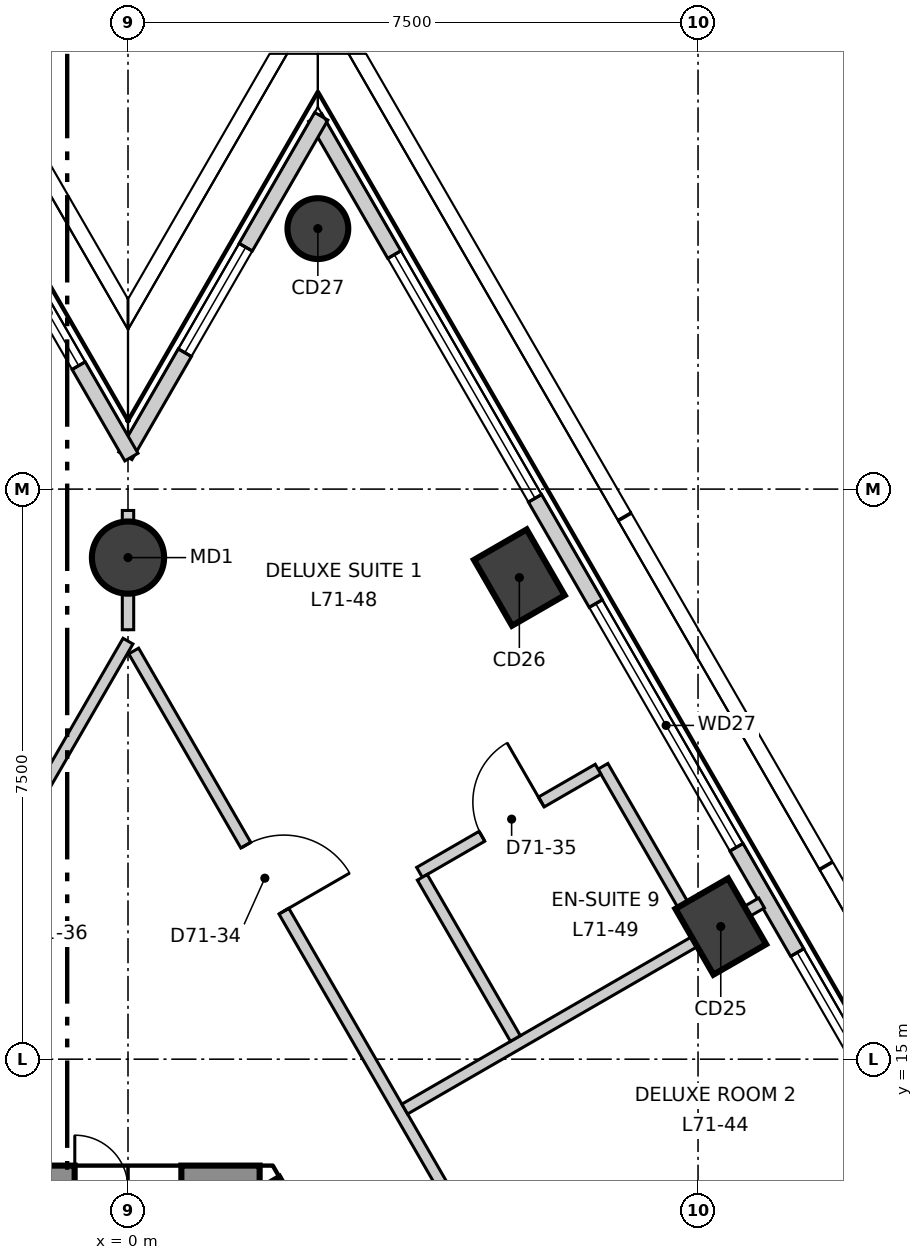
"""IFC4 building model, lengths in metres.
Left out: names, types, materials, properties, quantities, classifications, styles, units other than length and angle.
Written with IfcOpenShell. Run it as: python <this file> out.ifc"""

import sys

from ifc_helpers import new_model, si_unit, direction, frame, frame_2d, origin, origin_2d, place, context, subcontext, project, spatial, polyline, rectangle, circle, outline, extrude, element, fill, save


model = new_model("IFC4")
c1 = context("Model", 3, precision=1e-05, world=origin(), true_north=direction((0.0, 1.0)))
c2 = subcontext(c1, "Body", "Model", "MODEL_VIEW")
j1 = project(units=[si_unit("LENGTHUNIT", "METRE"), si_unit("PLANEANGLEUNIT", "RADIAN")], contexts=[c1])
p1 = place(None, origin())
s1 = spatial("IfcSite", under=j1, at=p1, CompositionType="ELEMENT")
p2 = place(p1, origin())
s2 = spatial("IfcBuilding", under=s1, at=p2, CompositionType="ELEMENT")
p3 = place(p2, frame((0.0, 0.0, 300.7)))
s3 = spatial("IfcBuildingStorey", under=s2, at=p3, CompositionType="ELEMENT", Elevation=300.7)
p4 = place(p3, frame((1.732, 13.3, -0.3), z_axis=(0.0, 0.0, 1.0), x_axis=(-1.0, 0.0, 0.0)))
e1 = element("IfcWall", 1, at=p4, inside=s3, PredefinedType="SHEAR", context=c2, shape_type="SweptSolid", body=[
    extrude(outline(polyline([(-0.173, -0.3), (1.732, -0.3), (3.637, -0.3), (3.291, 0.3), (1.732, 0.3), (0.173, 0.3), (-0.173, -0.3)])), origin(), (0.0, 0.0, 1.0), 3.6),
])
p5 = place(p4, frame((1.032, 0.0, 0.3)))
e2 = element("IfcOpeningElement", 2, at=p5, cuts=e1, PredefinedType="OPENING", context=c2, shape_type="SweptSolid", body=[
    extrude(rectangle(XDim=1.4, YDim=2.1, at=frame_2d((0.7, 1.05))), frame((0.0, 0.31, 0.0), z_axis=(0.0, -1.0, 0.0), x_axis=(1.0, 0.0, 0.0)), (0.0, 0.0, 1.0), 0.62),
])
p6 = place(p3, frame((12.384, -5.15, -0.3), z_axis=(0.0, 0.0, 1.0), x_axis=(-0.500000539815, 0.866025092122, 0.0)))
e3 = element("IfcWall", 3, at=p6, inside=s3, PredefinedType="SHEAR", context=c2, shape_type="SweptSolid", body=[
    extrude(outline(polyline([(-0.173, -0.301), (1.795, -0.301), (3.763, -0.301), (5.731, -0.301), (7.7, -0.301), (9.668, -0.301), (11.636, -0.301), (13.604, -0.3), (15.573, -0.3), (17.541, -0.3), (19.509, -0.3), (21.477, -0.3), (21.131, 0.3), (19.226, 0.3), (17.321, 0.3), (15.415, 0.3), (13.51, 0.3), (11.605, 0.3), (9.699, 0.3), (7.794, 0.3), (5.889, 0.3), (3.984, 0.3), (2.078, 0.3), (0.173, 0.3), (-0.173, -0.301)])), origin(), (0.0, 0.0, 1.0), 3.6),
])
p7 = place(p6, frame((16.328, 0.0, 0.3)))
e4 = element("IfcOpeningElement", 4, at=p7, cuts=e3, PredefinedType="OPENING", context=c2, shape_type="SweptSolid", body=[
    extrude(rectangle(XDim=1.0, YDim=2.1, at=frame_2d((0.5, 1.05))), frame((0.0, 0.31, 0.0), z_axis=(0.0, -1.0, 0.0), x_axis=(1.0, 0.0, 0.0)), (0.0, 0.0, 1.0), 0.621),
])
p8 = place(p6, frame((4.777, 0.0, 0.3)))
e5 = element("IfcOpeningElement", 5, at=p8, cuts=e3, PredefinedType="OPENING", context=c2, shape_type="SweptSolid", body=[
    extrude(rectangle(XDim=0.9, YDim=2.1, at=frame_2d((0.45, 1.05))), frame((0.0, 0.31, 0.0), z_axis=(0.0, -1.0, 0.0), x_axis=(1.0, 0.0, 0.0)), (0.0, 0.0, 1.0), 0.621),
])
for number, where, z_axis, x_axis in (
    (6, (7.799, 16.745, -0.3), (0.0, 0.0, 1.0), (-0.5, 0.866, 0.0)),
    (7, (5.149, 21.336, -0.3), (0.0, 0.0, 1.0), (-0.5, 0.866, 0.0)),
):
    element("IfcColumn", number, at=place(p3, frame(where, z_axis=z_axis, x_axis=x_axis)), inside=s3, PredefinedType="COLUMN", context=c2, shape_type="SweptSolid", body=[
        extrude(rectangle(XDim=1.0, YDim=0.8, at=origin_2d()), origin(), (0.0, 0.0, 1.0), 3.6),
    ])
p9 = place(p3, frame((2.498, 25.927, -0.3), z_axis=(0.0, 0.0, 1.0), x_axis=(-0.5, 0.866025403784, 0.0)))
e8 = element("IfcColumn", 8, at=p9, inside=s3, PredefinedType="COLUMN", context=c2, shape_type="SweptSolid", body=[
    extrude(circle(Radius=0.4, at=origin_2d()), origin(), (0.0, 0.0, 1.0), 3.6),
])
p10 = place(p3, frame((0.0, 21.599, -0.3), z_axis=(0.0, 0.0, 1.0), x_axis=(1.0, 0.0, 0.0)))
e9 = element("IfcColumn", 9, at=p10, inside=s3, PredefinedType="COLUMN", context=c2, shape_type="SweptSolid", body=[
    extrude(circle(Radius=0.475, at=origin_2d()), origin(), (0.0, 0.0, 1.0), 3.6),
])
p11 = place(p3, frame((24.96, -11.578, 0.0), z_axis=(0.0, 0.0, 1.0), x_axis=(-0.500002391419, 0.866024023094, 0.0)))
e10 = element("IfcWall", 10, at=p11, inside=s3, PredefinedType="ELEMENTEDWALL", context=c2, shape_type="SweptSolid", body=[
    extrude(rectangle(XDim=44.994, YDim=0.2, at=frame_2d((22.497, 0.0))), origin(), (0.0, 0.0, 1.0), 3.3),
])
p12 = place(p11, frame((2.103, 0.0, 0.9)))
e11 = element("IfcOpeningElement", 11, at=p12, cuts=e10, PredefinedType="OPENING", context=c2, shape_type="SweptSolid", body=[
    extrude(rectangle(XDim=3.7, YDim=2.2, at=frame_2d((1.85, 1.1))), frame((0.0, 0.11, 0.0), z_axis=(0.0, -1.0, 0.0), x_axis=(1.0, 0.0, 0.0)), (0.0, 0.0, 1.0), 0.22),
])
p13 = place(p11, frame((7.404, 0.0, 0.9)))
e12 = element("IfcOpeningElement", 12, at=p13, cuts=e10, PredefinedType="OPENING", context=c2, shape_type="SweptSolid", body=[
    extrude(rectangle(XDim=3.7, YDim=2.2, at=frame_2d((1.85, 1.1))), frame((0.0, 0.11, 0.0), z_axis=(0.0, -1.0, 0.0), x_axis=(1.0, 0.0, 0.0)), (0.0, 0.0, 1.0), 0.22),
])
p14 = place(p11, frame((12.705, 0.0, 0.9)))
e13 = element("IfcOpeningElement", 13, at=p14, cuts=e10, PredefinedType="OPENING", context=c2, shape_type="SweptSolid", body=[
    extrude(rectangle(XDim=3.7, YDim=2.2, at=frame_2d((1.85, 1.1))), frame((0.0, 0.11, 0.0), z_axis=(0.0, -1.0, 0.0), x_axis=(1.0, 0.0, 0.0)), (0.0, 0.0, 1.0), 0.22),
])
p15 = place(p11, frame((18.006, 0.0, 0.9)))
e14 = element("IfcOpeningElement", 14, at=p15, cuts=e10, PredefinedType="OPENING", context=c2, shape_type="SweptSolid", body=[
    extrude(rectangle(XDim=3.7, YDim=2.2, at=frame_2d((1.85, 1.1))), frame((0.0, 0.11, 0.0), z_axis=(0.0, -1.0, 0.0), x_axis=(1.0, 0.0, 0.0)), (0.0, 0.0, 1.0), 0.22),
])
p16 = place(p11, frame((23.308, 0.0, 0.9)))
e15 = element("IfcOpeningElement", 15, at=p16, cuts=e10, PredefinedType="OPENING", context=c2, shape_type="SweptSolid", body=[
    extrude(rectangle(XDim=3.7, YDim=2.2, at=frame_2d((1.85, 1.1))), frame((0.0, 0.11, 0.0), z_axis=(0.0, -1.0, 0.0), x_axis=(1.0, 0.0, 0.0)), (0.0, 0.0, 1.0), 0.22),
])
p17 = place(p11, frame((28.609, 0.0, 0.9)))
e16 = element("IfcOpeningElement", 16, at=p17, cuts=e10, PredefinedType="OPENING", context=c2, shape_type="SweptSolid", body=[
    extrude(rectangle(XDim=3.7, YDim=2.2, at=frame_2d((1.85, 1.1))), frame((0.0, 0.11, 0.0), z_axis=(0.0, -1.0, 0.0), x_axis=(1.0, 0.0, 0.0)), (0.0, 0.0, 1.0), 0.22),
])
p18 = place(p11, frame((33.91, 0.0, 0.9)))
e17 = element("IfcOpeningElement", 17, at=p18, cuts=e10, PredefinedType="OPENING", context=c2, shape_type="SweptSolid", body=[
    extrude(rectangle(XDim=3.7, YDim=2.2, at=frame_2d((1.85, 1.1))), frame((0.0, 0.11, 0.0), z_axis=(0.0, -1.0, 0.0), x_axis=(1.0, 0.0, 0.0)), (0.0, 0.0, 1.0), 0.22),
])
p19 = place(p11, frame((39.211, 0.0, 0.9)))
e18 = element("IfcOpeningElement", 18, at=p19, cuts=e10, PredefinedType="OPENING", context=c2, shape_type="SweptSolid", body=[
    extrude(rectangle(XDim=3.7, YDim=2.2, at=frame_2d((1.85, 1.1))), frame((0.0, 0.11, 0.0), z_axis=(0.0, -1.0, 0.0), x_axis=(1.0, 0.0, 0.0)), (0.0, 0.0, 1.0), 0.22),
])
p20 = place(p3, frame((2.543, 27.405, 0.0), z_axis=(0.0, 0.0, 1.0), x_axis=(-0.49983036304, -0.866123321579, 0.0)))
e19 = element("IfcWall", 19, at=p20, inside=s3, PredefinedType="ELEMENTEDWALL", context=c2, shape_type="SweptSolid", body=[
    extrude(rectangle(XDim=5.157, YDim=0.2, at=frame_2d((2.579, 0.0))), origin(), (0.0, 0.0, 1.0), 3.3),
])
p21 = place(p20, frame((1.99, 0.0, 0.9)))
e20 = element("IfcOpeningElement", 20, at=p21, cuts=e19, PredefinedType="OPENING", context=c2, shape_type="SweptSolid", body=[
    extrude(rectangle(XDim=1.6, YDim=2.2, at=frame_2d((0.8, 1.1))), frame((0.0, 0.11, 0.0), z_axis=(0.0, -1.0, 0.0), x_axis=(1.0, 0.0, 0.0)), (0.0, 0.0, 1.0), 0.22),
])
p22 = place(p3, frame((0.045, 22.921, 0.0), z_axis=(0.0, 0.0, 1.0), x_axis=(-0.49983036304, 0.866123321579, 0.0)))
e21 = element("IfcWall", 21, at=p22, inside=s3, PredefinedType="ELEMENTEDWALL", context=c2, shape_type="SweptSolid", body=[
    extrude(rectangle(XDim=5.157, YDim=0.2, at=frame_2d((2.579, 0.0))), origin(), (0.0, 0.0, 1.0), 3.3),
])
p23 = place(p22, frame((1.39, 0.0, 0.9)))
e22 = element("IfcOpeningElement", 22, at=p23, cuts=e21, PredefinedType="OPENING", context=c2, shape_type="SweptSolid", body=[
    extrude(rectangle(XDim=1.6, YDim=2.2, at=frame_2d((0.8, 1.1))), frame((0.0, 0.11, 0.0), z_axis=(0.0, -1.0, 0.0), x_axis=(1.0, 0.0, 0.0)), (0.0, 0.0, 1.0), 0.22),
])
p24 = place(p3, frame((-17.679, -10.12, 0.0), z_axis=(0.0, 0.0, 1.0), x_axis=(0.500008955215, 0.866020233427, 0.0)))
e23 = element("IfcWall", 23, at=p24, inside=s3, PredefinedType="PARTITIONING", context=c2, shape_type="SweptSolid", body=[
    extrude(rectangle(XDim=35.357, YDim=0.15, at=frame_2d((17.679, 0.0))), origin(), (0.0, 0.0, 1.0), 3.3),
])
p25 = place(p24, frame((31.307, 0.0, 0.0)))
e24 = element("IfcOpeningElement", 24, at=p25, cuts=e23, PredefinedType="OPENING", context=c2, shape_type="SweptSolid", body=[
    extrude(rectangle(XDim=1.0, YDim=2.1, at=frame_2d((0.5, 1.05))), frame((0.0, 0.085, 0.0), z_axis=(0.0, -1.0, 0.0), x_axis=(1.0, 0.0, 0.0)), (0.0, 0.0, 1.0), 0.17),
])
p26 = place(p24, frame((20.056, 0.0, 0.0)))
e25 = element("IfcOpeningElement", 25, at=p26, cuts=e23, PredefinedType="OPENING", context=c2, shape_type="SweptSolid", body=[
    extrude(rectangle(XDim=1.0, YDim=2.1, at=frame_2d((0.5, 1.05))), frame((0.0, 0.085, 0.0), z_axis=(0.0, -1.0, 0.0), x_axis=(1.0, 0.0, 0.0)), (0.0, 0.0, 1.0), 0.17),
])
p27 = place(p24, frame((13.253, 0.0, 0.0)))
e26 = element("IfcOpeningElement", 26, at=p27, cuts=e23, PredefinedType="OPENING", context=c2, shape_type="SweptSolid", body=[
    extrude(rectangle(XDim=1.0, YDim=2.1, at=frame_2d((0.5, 1.05))), frame((0.0, 0.085, 0.0), z_axis=(0.0, -1.0, 0.0), x_axis=(1.0, 0.0, 0.0)), (0.0, 0.0, 1.0), 0.17),
])
p28 = place(p24, frame((7.653, 0.0, 0.0)))
e27 = element("IfcOpeningElement", 27, at=p28, cuts=e23, PredefinedType="OPENING", context=c2, shape_type="SweptSolid", body=[
    extrude(rectangle(XDim=1.0, YDim=2.1, at=frame_2d((0.5, 1.05))), frame((0.0, 0.085, 0.0), z_axis=(0.0, -1.0, 0.0), x_axis=(1.0, 0.0, 0.0)), (0.0, 0.0, 1.0), 0.17),
])
p29 = place(p24, frame((2.952, 0.0, 0.0)))
e28 = element("IfcOpeningElement", 28, at=p29, cuts=e23, PredefinedType="OPENING", context=c2, shape_type="SweptSolid", body=[
    extrude(rectangle(XDim=1.0, YDim=2.1, at=frame_2d((0.5, 1.05))), frame((0.0, 0.085, 0.0), z_axis=(0.0, -1.0, 0.0), x_axis=(1.0, 0.0, 0.0)), (0.0, 0.0, 1.0), 0.17),
])
p30 = place(p3, frame((0.0, 20.65, 0.0), z_axis=(0.0, 0.0, 1.0), x_axis=(0.0, 1.0, 0.0)))
e29 = element("IfcWall", 29, at=p30, inside=s3, PredefinedType="PARTITIONING", context=c2, shape_type="SweptSolid", body=[
    extrude(rectangle(XDim=1.569, YDim=0.15, at=frame_2d((0.785, 0.0))), origin(), (0.0, 0.0, 1.0), 2.8),
])
p31 = place(p3, frame((0.075, 20.37, 0.0), z_axis=(0.0, 0.0, 1.0), x_axis=(0.500009775255, -0.866019759965, 0.0)))
e30 = element("IfcWall", 30, at=p31, inside=s3, PredefinedType="PARTITIONING", context=c2, shape_type="SweptSolid", body=[
    extrude(rectangle(XDim=35.207, YDim=0.15, at=frame_2d((17.604, 0.0))), origin(), (0.0, 0.0, 1.0), 3.3),
])
p32 = place(p31, frame((31.307, 0.0, 0.0)))
e31 = element("IfcOpeningElement", 31, at=p32, cuts=e30, PredefinedType="OPENING", context=c2, shape_type="SweptSolid", body=[
    extrude(rectangle(XDim=1.0, YDim=2.1, at=frame_2d((0.5, 1.05))), frame((0.0, 0.085, 0.0), z_axis=(0.0, -1.0, 0.0), x_axis=(1.0, 0.0, 0.0)), (0.0, 0.0, 1.0), 0.17),
])
p33 = place(p31, frame((20.355, 0.0, 0.0)))
e32 = element("IfcOpeningElement", 32, at=p33, cuts=e30, PredefinedType="OPENING", context=c2, shape_type="SweptSolid", body=[
    extrude(rectangle(XDim=1.0, YDim=2.1, at=frame_2d((0.5, 1.05))), frame((0.0, 0.085, 0.0), z_axis=(0.0, -1.0, 0.0), x_axis=(1.0, 0.0, 0.0)), (0.0, 0.0, 1.0), 0.17),
])
p34 = place(p31, frame((24.355, 0.0, 0.0)))
e33 = element("IfcOpeningElement", 33, at=p34, cuts=e30, PredefinedType="OPENING", context=c2, shape_type="SweptSolid", body=[
    extrude(rectangle(XDim=0.9, YDim=2.1, at=frame_2d((0.45, 1.05))), frame((0.0, 0.085, 0.0), z_axis=(0.0, -1.0, 0.0), x_axis=(1.0, 0.0, 0.0)), (0.0, 0.0, 1.0), 0.17),
])
p35 = place(p31, frame((22.255, 0.0, 0.0)))
e34 = element("IfcOpeningElement", 34, at=p35, cuts=e30, PredefinedType="OPENING", context=c2, shape_type="SweptSolid", body=[
    extrude(rectangle(XDim=0.9, YDim=2.1, at=frame_2d((0.45, 1.05))), frame((0.0, 0.085, 0.0), z_axis=(0.0, -1.0, 0.0), x_axis=(1.0, 0.0, 0.0)), (0.0, 0.0, 1.0), 0.17),
])
p36 = place(p31, frame((8.453, 0.0, 0.0)))
e35 = element("IfcOpeningElement", 35, at=p36, cuts=e30, PredefinedType="OPENING", context=c2, shape_type="SweptSolid", body=[
    extrude(rectangle(XDim=1.0, YDim=2.1, at=frame_2d((0.5, 1.05))), frame((0.0, 0.085, 0.0), z_axis=(0.0, -1.0, 0.0), x_axis=(1.0, 0.0, 0.0)), (0.0, 0.0, 1.0), 0.17),
])
p37 = place(p31, frame((13.753, 0.0, 0.0)))
e36 = element("IfcOpeningElement", 36, at=p37, cuts=e30, PredefinedType="OPENING", context=c2, shape_type="SweptSolid", body=[
    extrude(rectangle(XDim=0.9, YDim=2.1, at=frame_2d((0.45, 1.05))), frame((0.0, 0.085, 0.0), z_axis=(0.0, -1.0, 0.0), x_axis=(1.0, 0.0, 0.0)), (0.0, 0.0, 1.0), 0.17),
])
p38 = place(p31, frame((11.553, 0.0, 0.0)))
e37 = element("IfcOpeningElement", 37, at=p38, cuts=e30, PredefinedType="OPENING", context=c2, shape_type="SweptSolid", body=[
    extrude(rectangle(XDim=0.9, YDim=2.1, at=frame_2d((0.45, 1.05))), frame((0.0, 0.085, 0.0), z_axis=(0.0, -1.0, 0.0), x_axis=(1.0, 0.0, 0.0)), (0.0, 0.0, 1.0), 0.17),
])
p39 = place(p31, frame((2.951, 0.0, 0.0)))
e38 = element("IfcOpeningElement", 38, at=p39, cuts=e30, PredefinedType="OPENING", context=c2, shape_type="SweptSolid", body=[
    extrude(rectangle(XDim=1.0, YDim=2.1, at=frame_2d((0.5, 1.05))), frame((0.0, 0.085, 0.0), z_axis=(0.0, -1.0, 0.0), x_axis=(1.0, 0.0, 0.0)), (0.0, 0.0, 1.0), 0.17),
])
p40 = place(p3, frame((3.641, 14.344, 0.0), z_axis=(0.0, 0.0, 1.0), x_axis=(0.865995092734, 0.500052496605, 0.0)))
e39 = element("IfcWall", 39, at=p40, inside=s3, PredefinedType="PARTITIONING", context=c2, shape_type="SweptSolid", body=[
    extrude(rectangle(XDim=5.421, YDim=0.15, at=frame_2d((2.711, 0.0))), origin(), (0.0, 0.0, 1.0), 3.3),
])
p41 = place(p3, frame((6.249, 18.853, 0.0), z_axis=(0.0, 0.0, 1.0), x_axis=(0.500079482444, -0.865979509711, 0.0)))
e40 = element("IfcWall", 40, at=p41, inside=s3, PredefinedType="PARTITIONING", context=c2, shape_type="SweptSolid", body=[
    extrude(rectangle(XDim=2.525, YDim=0.15, at=frame_2d((1.263, 0.0))), origin(), (0.0, 0.0, 1.0), 2.6),
])
p42 = place(p3, frame((3.835, 17.458, 0.0), z_axis=(0.0, 0.0, 1.0), x_axis=(0.866008795918, 0.500028764566, 0.0)))
e41 = element("IfcWall", 41, at=p42, inside=s3, PredefinedType="PARTITIONING", context=c2, shape_type="SweptSolid", body=[
    extrude(rectangle(XDim=2.714, YDim=0.15, at=frame_2d((1.357, 0.0))), origin(), (0.0, 0.0, 1.0), 3.3),
])
p43 = place(p42, frame((0.95, 0.0, 0.0)))
e42 = element("IfcOpeningElement", 42, at=p43, cuts=e41, PredefinedType="OPENING", context=c2, shape_type="SweptSolid", body=[
    extrude(rectangle(XDim=0.9, YDim=2.1, at=frame_2d((0.45, 1.05))), frame((0.0, 0.085, 0.0), z_axis=(0.0, -1.0, 0.0), x_axis=(1.0, 0.0, 0.0)), (0.0, 0.0, 1.0), 0.17),
])
p44 = place(p3, frame((3.872, 17.393, 0.0), z_axis=(0.0, 0.0, 1.0), x_axis=(0.500073324283, -0.865983065851, 0.0)))
e43 = element("IfcWall", 43, at=p44, inside=s3, PredefinedType="PARTITIONING", context=c2, shape_type="SweptSolid", body=[
    extrude(rectangle(XDim=2.449, YDim=0.15, at=frame_2d((1.225, 0.0))), origin(), (0.0, 0.0, 1.0), 3.3),
])
p45 = place(p17, origin())
e44 = element("IfcWindow", 44, at=p45, inside=s3, PartitioningType="SINGLE_PANEL", PredefinedType="WINDOW", context=c2, shape_type="SweptSolid", body=[
    extrude(rectangle(XDim=3.7, YDim=2.2, at=frame_2d((1.85, 1.1))), frame((0.0, 0.03, 0.0), z_axis=(0.0, -1.0, 0.0), x_axis=(1.0, 0.0, 0.0)), (0.0, 0.0, 1.0), 0.06),
])
fill(e16, e44)
p46 = place(p18, origin())
e45 = element("IfcWindow", 45, at=p46, inside=s3, PartitioningType="SINGLE_PANEL", PredefinedType="WINDOW", context=c2, shape_type="SweptSolid", body=[
    extrude(rectangle(XDim=3.7, YDim=2.2, at=frame_2d((1.85, 1.1))), frame((0.0, 0.03, 0.0), z_axis=(0.0, -1.0, 0.0), x_axis=(1.0, 0.0, 0.0)), (0.0, 0.0, 1.0), 0.06),
])
fill(e17, e45)
p47 = place(p19, origin())
e46 = element("IfcWindow", 46, at=p47, inside=s3, PartitioningType="SINGLE_PANEL", PredefinedType="WINDOW", context=c2, shape_type="SweptSolid", body=[
    extrude(rectangle(XDim=3.7, YDim=2.2, at=frame_2d((1.85, 1.1))), frame((0.0, 0.03, 0.0), z_axis=(0.0, -1.0, 0.0), x_axis=(1.0, 0.0, 0.0)), (0.0, 0.0, 1.0), 0.06),
])
fill(e18, e46)
p48 = place(p21, origin())
e47 = element("IfcWindow", 47, at=p48, inside=s3, PartitioningType="SINGLE_PANEL", PredefinedType="WINDOW", context=c2, shape_type="SweptSolid", body=[
    extrude(rectangle(XDim=1.6, YDim=2.2, at=frame_2d((0.8, 1.1))), frame((0.0, 0.03, 0.0), z_axis=(0.0, -1.0, 0.0), x_axis=(1.0, 0.0, 0.0)), (0.0, 0.0, 1.0), 0.06),
])
fill(e20, e47)
p49 = place(p23, origin())
e48 = element("IfcWindow", 48, at=p49, inside=s3, PartitioningType="SINGLE_PANEL", PredefinedType="WINDOW", context=c2, shape_type="SweptSolid", body=[
    extrude(rectangle(XDim=1.6, YDim=2.2, at=frame_2d((0.8, 1.1))), frame((0.0, 0.03, 0.0), z_axis=(0.0, -1.0, 0.0), x_axis=(1.0, 0.0, 0.0)), (0.0, 0.0, 1.0), 0.06),
])
fill(e22, e48)
p50 = place(p39, origin())
e49 = element("IfcDoor", 49, at=p50, inside=s3, OperationType="SINGLE_SWING_LEFT", PredefinedType="DOOR", context=c2, shape_type="SweptSolid", body=[
    extrude(rectangle(XDim=1.0, YDim=2.1, at=frame_2d((0.5, 1.05))), frame((0.0, 0.025, 0.0), z_axis=(0.0, -1.0, 0.0), x_axis=(1.0, 0.0, 0.0)), (0.0, 0.0, 1.0), 0.05),
])
fill(e38, e49)
p51 = place(p43, origin())
e50 = element("IfcDoor", 50, at=p51, inside=s3, OperationType="SINGLE_SWING_LEFT", PredefinedType="DOOR", context=c2, shape_type="SweptSolid", body=[
    extrude(rectangle(XDim=0.9, YDim=2.1, at=frame_2d((0.45, 1.05))), frame((0.0, 0.025, 0.0), z_axis=(0.0, -1.0, 0.0), x_axis=(1.0, 0.0, 0.0)), (0.0, 0.0, 1.0), 0.05),
])
fill(e42, e50)
save(model, sys.argv[1])
